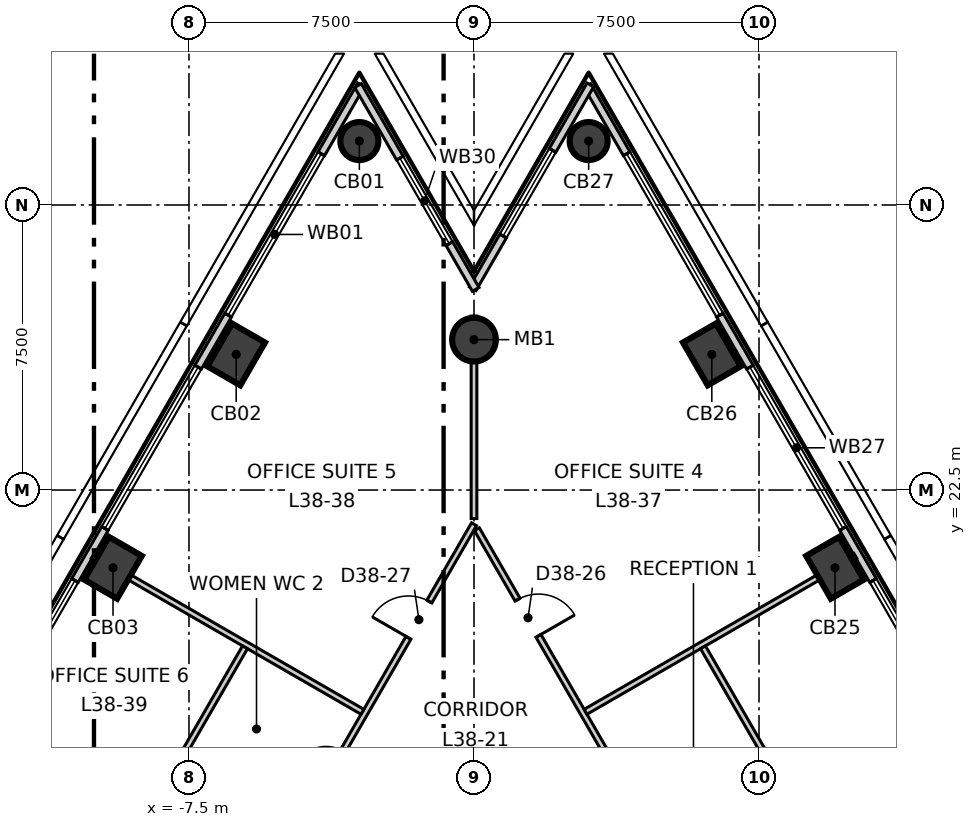
"""IFC4 building model, lengths in metres.
Left out: names, types, materials, properties, quantities, classifications, styles, units other than length and angle.
Written with IfcOpenShell. Run it as: python <this file> out.ifc"""

import sys

from ifc_helpers import new_model, si_unit, direction, frame, frame_2d, origin, origin_2d, place, context, subcontext, project, spatial, rectangle, circle, extrude, element, fill, save


model = new_model("IFC4")
c1 = context("Model", 3, precision=1e-05, world=origin(), true_north=direction((0.0, 1.0)))
c2 = subcontext(c1, "Body", "Model", "MODEL_VIEW")
j1 = project(units=[si_unit("LENGTHUNIT", "METRE"), si_unit("PLANEANGLEUNIT", "RADIAN")], contexts=[c1])
p1 = place(None, origin())
s1 = spatial("IfcSite", under=j1, at=p1, CompositionType="ELEMENT")
p2 = place(p1, origin())
s2 = spatial("IfcBuilding", under=s1, at=p2, CompositionType="ELEMENT")
p3 = place(p2, frame((0.0, 0.0, 164.3)))
s3 = spatial("IfcBuildingStorey", under=s2, at=p3, CompositionType="ELEMENT", Elevation=164.3)
p4 = place(p3, frame((-3.017, 31.682, -0.3), z_axis=(0.0, 0.0, 1.0), x_axis=(0.5, 0.866025403784, 0.0)))
e1 = element("IfcColumn", 1, at=p4, inside=s3, PredefinedType="COLUMN", context=c2, shape_type="SweptSolid", body=[
    extrude(circle(Radius=0.5, at=origin_2d()), origin(), (0.0, 0.0, 1.0), 4.0),
])
for number, where, z_axis, x_axis in (
    (2, (-6.258, 26.068, -0.3), (0.0, 0.0, 1.0), (0.5, 0.866, 0.0)),
    (3, (-9.499, 20.454, -0.3), (0.0, 0.0, 1.0), (0.5, 0.866, 0.0)),
    (4, (9.499, 20.454, -0.3), (0.0, 0.0, 1.0), (-0.5, 0.866, 0.0)),
    (5, (6.258, 26.068, -0.3), (0.0, 0.0, 1.0), (-0.5, 0.866, 0.0)),
):
    element("IfcColumn", number, at=place(p3, frame(where, z_axis=z_axis, x_axis=x_axis)), inside=s3, PredefinedType="COLUMN", context=c2, shape_type="SweptSolid", body=[
        extrude(rectangle(XDim=1.3, YDim=1.0, at=origin_2d()), origin(), (0.0, 0.0, 1.0), 4.0),
    ])
p5 = place(p3, frame((3.017, 31.682, -0.3), z_axis=(0.0, 0.0, 1.0), x_axis=(-0.5, 0.866025403784, 0.0)))
e6 = element("IfcColumn", 6, at=p5, inside=s3, PredefinedType="COLUMN", context=c2, shape_type="SweptSolid", body=[
    extrude(circle(Radius=0.5, at=origin_2d()), origin(), (0.0, 0.0, 1.0), 4.0),
])
p6 = place(p3, frame((0.0, 26.457, -0.3), z_axis=(0.0, 0.0, 1.0), x_axis=(1.0, 0.0, 0.0)))
e7 = element("IfcColumn", 7, at=p6, inside=s3, PredefinedType="COLUMN", context=c2, shape_type="SweptSolid", body=[
    extrude(circle(Radius=0.575, at=origin_2d()), origin(), (0.0, 0.0, 1.0), 4.0),
])
p7 = place(p3, frame((-2.972, 33.16, 0.0), z_axis=(0.0, 0.0, 1.0), x_axis=(-0.500009959561, -0.866019653553, 0.0)))
e8 = element("IfcWall", 8, at=p7, inside=s3, PredefinedType="ELEMENTEDWALL", context=c2, shape_type="SweptSolid", body=[
    extrude(rectangle(XDim=54.443, YDim=0.2, at=frame_2d((27.222, 0.0))), origin(), (0.0, 0.0, 1.0), 3.7),
])
p8 = place(p7, frame((2.094, 0.0, 0.9)))
e9 = element("IfcOpeningElement", 9, at=p8, cuts=e8, PredefinedType="OPENING", context=c2, shape_type="SweptSolid", body=[
    extrude(rectangle(XDim=4.9, YDim=2.5, at=frame_2d((2.45, 1.25))), frame((0.0, 0.11, 0.0), z_axis=(0.0, -1.0, 0.0), x_axis=(1.0, 0.0, 0.0)), (0.0, 0.0, 1.0), 0.22),
])
p9 = place(p7, frame((8.576, 0.0, 0.9)))
e10 = element("IfcOpeningElement", 10, at=p9, cuts=e8, PredefinedType="OPENING", context=c2, shape_type="SweptSolid", body=[
    extrude(rectangle(XDim=4.9, YDim=2.5, at=frame_2d((2.45, 1.25))), frame((0.0, 0.11, 0.0), z_axis=(0.0, -1.0, 0.0), x_axis=(1.0, 0.0, 0.0)), (0.0, 0.0, 1.0), 0.22),
])
p10 = place(p7, frame((15.058, 0.0, 0.9)))
e11 = element("IfcOpeningElement", 11, at=p10, cuts=e8, PredefinedType="OPENING", context=c2, shape_type="SweptSolid", body=[
    extrude(rectangle(XDim=4.9, YDim=2.5, at=frame_2d((2.45, 1.25))), frame((0.0, 0.11, 0.0), z_axis=(0.0, -1.0, 0.0), x_axis=(1.0, 0.0, 0.0)), (0.0, 0.0, 1.0), 0.22),
])
p11 = place(p7, frame((21.54, 0.0, 0.9)))
e12 = element("IfcOpeningElement", 12, at=p11, cuts=e8, PredefinedType="OPENING", context=c2, shape_type="SweptSolid", body=[
    extrude(rectangle(XDim=4.9, YDim=2.5, at=frame_2d((2.45, 1.25))), frame((0.0, 0.11, 0.0), z_axis=(0.0, -1.0, 0.0), x_axis=(1.0, 0.0, 0.0)), (0.0, 0.0, 1.0), 0.22),
])
p12 = place(p7, frame((28.022, 0.0, 0.9)))
e13 = element("IfcOpeningElement", 13, at=p12, cuts=e8, PredefinedType="OPENING", context=c2, shape_type="SweptSolid", body=[
    extrude(rectangle(XDim=4.9, YDim=2.5, at=frame_2d((2.45, 1.25))), frame((0.0, 0.11, 0.0), z_axis=(0.0, -1.0, 0.0), x_axis=(1.0, 0.0, 0.0)), (0.0, 0.0, 1.0), 0.22),
])
p13 = place(p7, frame((34.505, 0.0, 0.9)))
e14 = element("IfcOpeningElement", 14, at=p13, cuts=e8, PredefinedType="OPENING", context=c2, shape_type="SweptSolid", body=[
    extrude(rectangle(XDim=4.9, YDim=2.5, at=frame_2d((2.45, 1.25))), frame((0.0, 0.11, 0.0), z_axis=(0.0, -1.0, 0.0), x_axis=(1.0, 0.0, 0.0)), (0.0, 0.0, 1.0), 0.22),
])
p14 = place(p7, frame((40.987, 0.0, 0.9)))
e15 = element("IfcOpeningElement", 15, at=p14, cuts=e8, PredefinedType="OPENING", context=c2, shape_type="SweptSolid", body=[
    extrude(rectangle(XDim=4.9, YDim=2.5, at=frame_2d((2.45, 1.25))), frame((0.0, 0.11, 0.0), z_axis=(0.0, -1.0, 0.0), x_axis=(1.0, 0.0, 0.0)), (0.0, 0.0, 1.0), 0.22),
])
p15 = place(p7, frame((47.469, 0.0, 0.9)))
e16 = element("IfcOpeningElement", 16, at=p15, cuts=e8, PredefinedType="OPENING", context=c2, shape_type="SweptSolid", body=[
    extrude(rectangle(XDim=4.9, YDim=2.5, at=frame_2d((2.45, 1.25))), frame((0.0, 0.11, 0.0), z_axis=(0.0, -1.0, 0.0), x_axis=(1.0, 0.0, 0.0)), (0.0, 0.0, 1.0), 0.22),
])
p16 = place(p3, frame((30.204, -14.006, 0.0), z_axis=(0.0, 0.0, 1.0), x_axis=(-0.500008017777, 0.866020774669, 0.0)))
e17 = element("IfcWall", 17, at=p16, inside=s3, PredefinedType="ELEMENTEDWALL", context=c2, shape_type="SweptSolid", body=[
    extrude(rectangle(XDim=54.443, YDim=0.2, at=frame_2d((27.222, 0.0))), origin(), (0.0, 0.0, 1.0), 3.7),
])
p17 = place(p16, frame((2.094, 0.0, 0.9)))
e18 = element("IfcOpeningElement", 18, at=p17, cuts=e17, PredefinedType="OPENING", context=c2, shape_type="SweptSolid", body=[
    extrude(rectangle(XDim=4.9, YDim=2.5, at=frame_2d((2.45, 1.25))), frame((0.0, 0.11, 0.0), z_axis=(0.0, -1.0, 0.0), x_axis=(1.0, 0.0, 0.0)), (0.0, 0.0, 1.0), 0.22),
])
p18 = place(p16, frame((8.576, 0.0, 0.9)))
e19 = element("IfcOpeningElement", 19, at=p18, cuts=e17, PredefinedType="OPENING", context=c2, shape_type="SweptSolid", body=[
    extrude(rectangle(XDim=4.9, YDim=2.5, at=frame_2d((2.45, 1.25))), frame((0.0, 0.11, 0.0), z_axis=(0.0, -1.0, 0.0), x_axis=(1.0, 0.0, 0.0)), (0.0, 0.0, 1.0), 0.22),
])
p19 = place(p16, frame((15.058, 0.0, 0.9)))
e20 = element("IfcOpeningElement", 20, at=p19, cuts=e17, PredefinedType="OPENING", context=c2, shape_type="SweptSolid", body=[
    extrude(rectangle(XDim=4.9, YDim=2.5, at=frame_2d((2.45, 1.25))), frame((0.0, 0.11, 0.0), z_axis=(0.0, -1.0, 0.0), x_axis=(1.0, 0.0, 0.0)), (0.0, 0.0, 1.0), 0.22),
])
p20 = place(p16, frame((21.54, 0.0, 0.9)))
e21 = element("IfcOpeningElement", 21, at=p20, cuts=e17, PredefinedType="OPENING", context=c2, shape_type="SweptSolid", body=[
    extrude(rectangle(XDim=4.9, YDim=2.5, at=frame_2d((2.45, 1.25))), frame((0.0, 0.11, 0.0), z_axis=(0.0, -1.0, 0.0), x_axis=(1.0, 0.0, 0.0)), (0.0, 0.0, 1.0), 0.22),
])
p21 = place(p16, frame((28.023, 0.0, 0.9)))
e22 = element("IfcOpeningElement", 22, at=p21, cuts=e17, PredefinedType="OPENING", context=c2, shape_type="SweptSolid", body=[
    extrude(rectangle(XDim=4.9, YDim=2.5, at=frame_2d((2.45, 1.25))), frame((0.0, 0.11, 0.0), z_axis=(0.0, -1.0, 0.0), x_axis=(1.0, 0.0, 0.0)), (0.0, 0.0, 1.0), 0.22),
])
p22 = place(p16, frame((34.505, 0.0, 0.9)))
e23 = element("IfcOpeningElement", 23, at=p22, cuts=e17, PredefinedType="OPENING", context=c2, shape_type="SweptSolid", body=[
    extrude(rectangle(XDim=4.9, YDim=2.5, at=frame_2d((2.45, 1.25))), frame((0.0, 0.11, 0.0), z_axis=(0.0, -1.0, 0.0), x_axis=(1.0, 0.0, 0.0)), (0.0, 0.0, 1.0), 0.22),
])
p23 = place(p16, frame((40.987, 0.0, 0.9)))
e24 = element("IfcOpeningElement", 24, at=p23, cuts=e17, PredefinedType="OPENING", context=c2, shape_type="SweptSolid", body=[
    extrude(rectangle(XDim=4.9, YDim=2.5, at=frame_2d((2.45, 1.25))), frame((0.0, 0.11, 0.0), z_axis=(0.0, -1.0, 0.0), x_axis=(1.0, 0.0, 0.0)), (0.0, 0.0, 1.0), 0.22),
])
p24 = place(p16, frame((47.469, 0.0, 0.9)))
e25 = element("IfcOpeningElement", 25, at=p24, cuts=e17, PredefinedType="OPENING", context=c2, shape_type="SweptSolid", body=[
    extrude(rectangle(XDim=4.9, YDim=2.5, at=frame_2d((2.45, 1.25))), frame((0.0, 0.11, 0.0), z_axis=(0.0, -1.0, 0.0), x_axis=(1.0, 0.0, 0.0)), (0.0, 0.0, 1.0), 0.22),
])
p25 = place(p3, frame((3.062, 33.16, 0.0), z_axis=(0.0, 0.0, 1.0), x_axis=(-0.50000110078, -0.866024768248, 0.0)))
e26 = element("IfcWall", 26, at=p25, inside=s3, PredefinedType="ELEMENTEDWALL", context=c2, shape_type="SweptSolid", body=[
    extrude(rectangle(XDim=6.194, YDim=0.2, at=frame_2d((3.097, 0.0))), origin(), (0.0, 0.0, 1.0), 3.7),
])
p26 = place(p25, frame((1.99, 0.0, 0.9)))
e27 = element("IfcOpeningElement", 27, at=p26, cuts=e26, PredefinedType="OPENING", context=c2, shape_type="SweptSolid", body=[
    extrude(rectangle(XDim=2.6, YDim=2.5, at=frame_2d((1.3, 1.25))), frame((0.0, 0.11, 0.0), z_axis=(0.0, -1.0, 0.0), x_axis=(1.0, 0.0, 0.0)), (0.0, 0.0, 1.0), 0.22),
])
p27 = place(p3, frame((0.045, 27.779, 0.0), z_axis=(0.0, 0.0, 1.0), x_axis=(-0.50000110078, 0.866024768248, 0.0)))
e28 = element("IfcWall", 28, at=p27, inside=s3, PredefinedType="ELEMENTEDWALL", context=c2, shape_type="SweptSolid", body=[
    extrude(rectangle(XDim=6.194, YDim=0.2, at=frame_2d((3.097, 0.0))), origin(), (0.0, 0.0, 1.0), 3.7),
])
p28 = place(p27, frame((1.39, 0.0, 0.9)))
e29 = element("IfcOpeningElement", 29, at=p28, cuts=e28, PredefinedType="OPENING", context=c2, shape_type="SweptSolid", body=[
    extrude(rectangle(XDim=2.6, YDim=2.5, at=frame_2d((1.3, 1.25))), frame((0.0, 0.11, 0.0), z_axis=(0.0, -1.0, 0.0), x_axis=(1.0, 0.0, 0.0)), (0.0, 0.0, 1.0), 0.22),
])
p29 = place(p3, frame((-8.903, 6.18, 0.0), z_axis=(0.0, 0.0, 1.0), x_axis=(0.500010074151, 0.866019587393, 0.0)))
e30 = element("IfcWall", 30, at=p29, inside=s3, PredefinedType="PARTITIONING", context=c2, shape_type="SweptSolid", body=[
    extrude(rectangle(XDim=17.806, YDim=0.15, at=frame_2d((8.903, 0.0))), origin(), (0.0, 0.0, 1.0), 3.7),
])
p30 = place(p29, frame((14.356, 0.0, 0.0)))
e31 = element("IfcOpeningElement", 31, at=p30, cuts=e30, PredefinedType="OPENING", context=c2, shape_type="SweptSolid", body=[
    extrude(rectangle(XDim=1.1, YDim=2.1, at=frame_2d((0.55, 1.05))), frame((0.0, 0.085, 0.0), z_axis=(0.0, -1.0, 0.0), x_axis=(1.0, 0.0, 0.0)), (0.0, 0.0, 1.0), 0.17),
])
p31 = place(p29, frame((10.014, 0.0, 0.0)))
e32 = element("IfcOpeningElement", 32, at=p31, cuts=e30, PredefinedType="OPENING", context=c2, shape_type="SweptSolid", body=[
    extrude(rectangle(XDim=0.9, YDim=2.1, at=frame_2d((0.45, 1.05))), frame((0.0, 0.085, 0.0), z_axis=(0.0, -1.0, 0.0), x_axis=(1.0, 0.0, 0.0)), (0.0, 0.0, 1.0), 0.17),
])
p32 = place(p29, frame((6.814, 0.0, 0.0)))
e33 = element("IfcOpeningElement", 33, at=p32, cuts=e30, PredefinedType="OPENING", context=c2, shape_type="SweptSolid", body=[
    extrude(rectangle(XDim=0.9, YDim=2.1, at=frame_2d((0.45, 1.05))), frame((0.0, 0.085, 0.0), z_axis=(0.0, -1.0, 0.0), x_axis=(1.0, 0.0, 0.0)), (0.0, 0.0, 1.0), 0.17),
])
p33 = place(p29, frame((4.014, 0.0, 0.0)))
e34 = element("IfcOpeningElement", 34, at=p33, cuts=e30, PredefinedType="OPENING", context=c2, shape_type="SweptSolid", body=[
    extrude(rectangle(XDim=1.0, YDim=2.1, at=frame_2d((0.5, 1.05))), frame((0.0, 0.085, 0.0), z_axis=(0.0, -1.0, 0.0), x_axis=(1.0, 0.0, 0.0)), (0.0, 0.0, 1.0), 0.17),
])
p34 = place(p3, frame((-10.036, 20.764, 0.0), z_axis=(0.0, 0.0, 1.0), x_axis=(0.866037308103, -0.499979380549, 0.0)))
e35 = element("IfcWall", 35, at=p34, inside=s3, PredefinedType="PARTITIONING", context=c2, shape_type="SweptSolid", body=[
    extrude(rectangle(XDim=8.198, YDim=0.15, at=frame_2d((4.099, 0.0))), origin(), (0.0, 0.0, 1.0), 3.7),
])
p35 = place(p3, frame((-10.389, 10.806, 0.0), z_axis=(0.0, 0.0, 1.0), x_axis=(0.500042162787, 0.86600105972, 0.0)))
e36 = element("IfcWall", 36, at=p35, inside=s3, PredefinedType="PARTITIONING", context=c2, shape_type="SweptSolid", body=[
    extrude(rectangle(XDim=8.725, YDim=0.15, at=frame_2d((4.363, 0.0))), origin(), (0.0, 0.0, 1.0), 3.7),
])
p36 = place(p3, frame((0.0, 21.75, 0.0), z_axis=(0.0, 0.0, 1.0), x_axis=(0.0, 1.0, 0.0)))
e37 = element("IfcWall", 37, at=p36, inside=s3, PredefinedType="PARTITIONING", context=c2, shape_type="SweptSolid", body=[
    extrude(rectangle(XDim=5.327, YDim=0.15, at=frame_2d((2.664, 0.0))), origin(), (0.0, 0.0, 1.0), 3.2),
])
p37 = place(p3, frame((0.076, 21.468, 0.0), z_axis=(0.0, 0.0, 1.0), x_axis=(0.500024127084, -0.866011473558, 0.0)))
e38 = element("IfcWall", 38, at=p37, inside=s3, PredefinedType="PARTITIONING", context=c2, shape_type="SweptSolid", body=[
    extrude(rectangle(XDim=17.654, YDim=0.15, at=frame_2d((8.827, 0.0))), origin(), (0.0, 0.0, 1.0), 3.7),
])
p38 = place(p37, frame((11.104, 0.0, 0.0)))
e39 = element("IfcOpeningElement", 39, at=p38, cuts=e38, PredefinedType="OPENING", context=c2, shape_type="SweptSolid", body=[
    extrude(rectangle(XDim=1.1, YDim=2.1, at=frame_2d((0.55, 1.05))), frame((0.0, 0.085, 0.0), z_axis=(0.0, -1.0, 0.0), x_axis=(1.0, 0.0, 0.0)), (0.0, 0.0, 1.0), 0.17),
])
p39 = place(p37, frame((2.14, 0.0, 0.0)))
e40 = element("IfcOpeningElement", 40, at=p39, cuts=e38, PredefinedType="OPENING", context=c2, shape_type="SweptSolid", body=[
    extrude(rectangle(XDim=1.1, YDim=2.1, at=frame_2d((0.55, 1.05))), frame((0.0, 0.085, 0.0), z_axis=(0.0, -1.0, 0.0), x_axis=(1.0, 0.0, 0.0)), (0.0, 0.0, 1.0), 0.17),
])
p40 = place(p3, frame((2.936, 16.665, 0.0), z_axis=(0.0, 0.0, 1.0), x_axis=(0.866037308103, 0.499979380549, 0.0)))
e41 = element("IfcWall", 41, at=p40, inside=s3, PredefinedType="PARTITIONING", context=c2, shape_type="SweptSolid", body=[
    extrude(rectangle(XDim=8.198, YDim=0.15, at=frame_2d((4.099, 0.0))), origin(), (0.0, 0.0, 1.0), 3.7),
])
p41 = place(p3, frame((6.026, 18.362, 0.0), z_axis=(0.0, 0.0, 1.0), x_axis=(0.499991479218, -0.866030323204, 0.0)))
e42 = element("IfcWall", 42, at=p41, inside=s3, PredefinedType="PARTITIONING", context=c2, shape_type="SweptSolid", body=[
    extrude(rectangle(XDim=11.914, YDim=0.15, at=frame_2d((5.957, 0.0))), origin(), (0.0, 0.0, 1.0), 3.7),
])
p42 = place(p41, frame((5.439, 0.0, 0.0)))
e43 = element("IfcOpeningElement", 43, at=p42, cuts=e42, PredefinedType="OPENING", context=c2, shape_type="SweptSolid", body=[
    extrude(rectangle(XDim=1.0, YDim=2.1, at=frame_2d((0.5, 1.05))), frame((0.0, 0.085, 0.0), z_axis=(0.0, -1.0, 0.0), x_axis=(1.0, 0.0, 0.0)), (0.0, 0.0, 1.0), 0.17),
])
p43 = place(p8, origin())
e44 = element("IfcWindow", 44, at=p43, inside=s3, PartitioningType="SINGLE_PANEL", PredefinedType="WINDOW", context=c2, shape_type="SweptSolid", body=[
    extrude(rectangle(XDim=4.9, YDim=2.5, at=frame_2d((2.45, 1.25))), frame((0.0, 0.03, 0.0), z_axis=(0.0, -1.0, 0.0), x_axis=(1.0, 0.0, 0.0)), (0.0, 0.0, 1.0), 0.06),
])
fill(e9, e44)
p44 = place(p9, origin())
e45 = element("IfcWindow", 45, at=p44, inside=s3, PartitioningType="SINGLE_PANEL", PredefinedType="WINDOW", context=c2, shape_type="SweptSolid", body=[
    extrude(rectangle(XDim=4.9, YDim=2.5, at=frame_2d((2.45, 1.25))), frame((0.0, 0.03, 0.0), z_axis=(0.0, -1.0, 0.0), x_axis=(1.0, 0.0, 0.0)), (0.0, 0.0, 1.0), 0.06),
])
fill(e10, e45)
p45 = place(p10, origin())
e46 = element("IfcWindow", 46, at=p45, inside=s3, PartitioningType="SINGLE_PANEL", PredefinedType="WINDOW", context=c2, shape_type="SweptSolid", body=[
    extrude(rectangle(XDim=4.9, YDim=2.5, at=frame_2d((2.45, 1.25))), frame((0.0, 0.03, 0.0), z_axis=(0.0, -1.0, 0.0), x_axis=(1.0, 0.0, 0.0)), (0.0, 0.0, 1.0), 0.06),
])
fill(e11, e46)
p46 = place(p22, origin())
e47 = element("IfcWindow", 47, at=p46, inside=s3, PartitioningType="SINGLE_PANEL", PredefinedType="WINDOW", context=c2, shape_type="SweptSolid", body=[
    extrude(rectangle(XDim=4.9, YDim=2.5, at=frame_2d((2.45, 1.25))), frame((0.0, 0.03, 0.0), z_axis=(0.0, -1.0, 0.0), x_axis=(1.0, 0.0, 0.0)), (0.0, 0.0, 1.0), 0.06),
])
fill(e23, e47)
p47 = place(p23, origin())
e48 = element("IfcWindow", 48, at=p47, inside=s3, PartitioningType="SINGLE_PANEL", PredefinedType="WINDOW", context=c2, shape_type="SweptSolid", body=[
    extrude(rectangle(XDim=4.9, YDim=2.5, at=frame_2d((2.45, 1.25))), frame((0.0, 0.03, 0.0), z_axis=(0.0, -1.0, 0.0), x_axis=(1.0, 0.0, 0.0)), (0.0, 0.0, 1.0), 0.06),
])
fill(e24, e48)
p48 = place(p24, origin())
e49 = element("IfcWindow", 49, at=p48, inside=s3, PartitioningType="SINGLE_PANEL", PredefinedType="WINDOW", context=c2, shape_type="SweptSolid", body=[
    extrude(rectangle(XDim=4.9, YDim=2.5, at=frame_2d((2.45, 1.25))), frame((0.0, 0.03, 0.0), z_axis=(0.0, -1.0, 0.0), x_axis=(1.0, 0.0, 0.0)), (0.0, 0.0, 1.0), 0.06),
])
fill(e25, e49)
p49 = place(p26, origin())
e50 = element("IfcWindow", 50, at=p49, inside=s3, PartitioningType="SINGLE_PANEL", PredefinedType="WINDOW", context=c2, shape_type="SweptSolid", body=[
    extrude(rectangle(XDim=2.6, YDim=2.5, at=frame_2d((1.3, 1.25))), frame((0.0, 0.03, 0.0), z_axis=(0.0, -1.0, 0.0), x_axis=(1.0, 0.0, 0.0)), (0.0, 0.0, 1.0), 0.06),
])
fill(e27, e50)
p50 = place(p28, origin())
e51 = element("IfcWindow", 51, at=p50, inside=s3, PartitioningType="SINGLE_PANEL", PredefinedType="WINDOW", context=c2, shape_type="SweptSolid", body=[
    extrude(rectangle(XDim=2.6, YDim=2.5, at=frame_2d((1.3, 1.25))), frame((0.0, 0.03, 0.0), z_axis=(0.0, -1.0, 0.0), x_axis=(1.0, 0.0, 0.0)), (0.0, 0.0, 1.0), 0.06),
])
fill(e29, e51)
p51 = place(p39, origin())
e52 = element("IfcDoor", 52, at=p51, inside=s3, OperationType="SINGLE_SWING_LEFT", PredefinedType="DOOR", context=c2, shape_type="SweptSolid", body=[
    extrude(rectangle(XDim=1.1, YDim=2.1, at=frame_2d((0.55, 1.05))), frame((0.0, 0.025, 0.0), z_axis=(0.0, -1.0, 0.0), x_axis=(1.0, 0.0, 0.0)), (0.0, 0.0, 1.0), 0.05),
])
fill(e40, e52)
p52 = place(p30, origin())
e53 = element("IfcDoor", 53, at=p52, inside=s3, OperationType="SINGLE_SWING_RIGHT", PredefinedType="DOOR", context=c2, shape_type="SweptSolid", body=[
    extrude(rectangle(XDim=1.1, YDim=2.1, at=frame_2d((0.55, 1.05))), frame((0.0, 0.025, 0.0), z_axis=(0.0, -1.0, 0.0), x_axis=(1.0, 0.0, 0.0)), (0.0, 0.0, 1.0), 0.05),
])
fill(e31, e53)
save(model, sys.argv[1])
